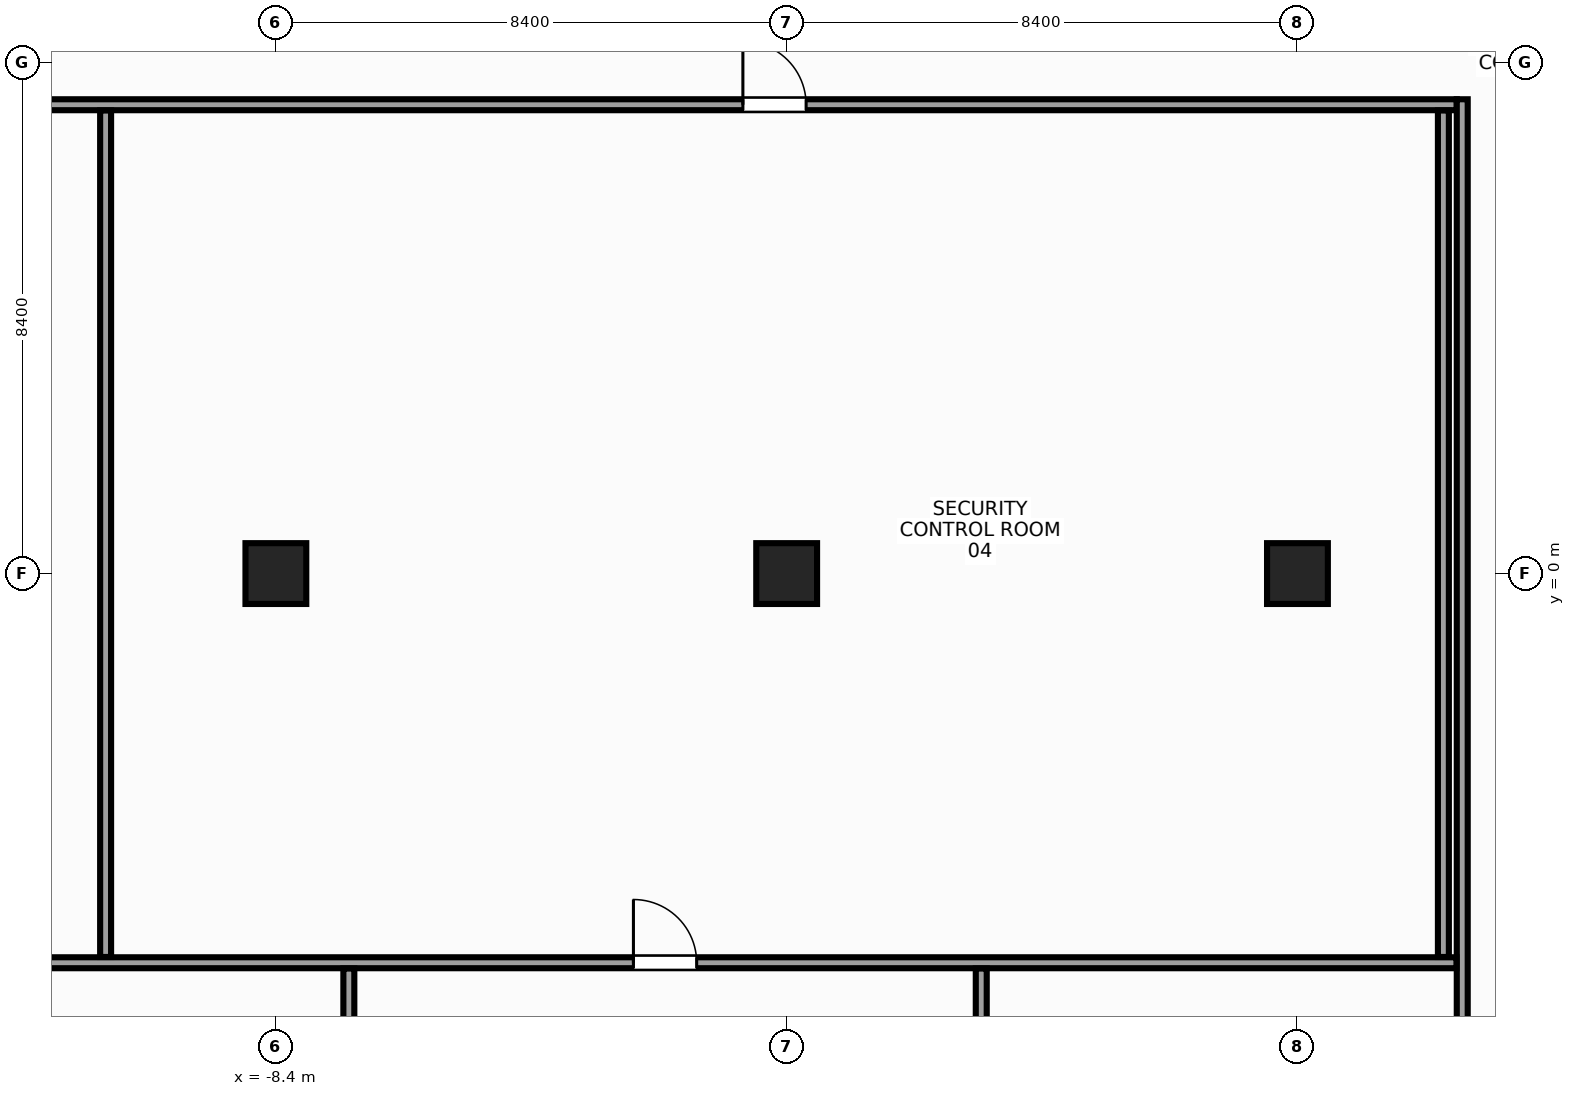
"""IFC4 building model, lengths in metres.
Left out: names, types, materials, properties, quantities, classifications, styles, units other than length and angle.
Written with IfcOpenShell. Run it as: python <this file> out.ifc"""

import sys

from ifc_helpers import new_model, si_unit, direction, frame, frame_2d, origin, origin_with_axes, origin_2d, place, context, subcontext, project, spatial, rectangle, hollow_rectangle, extrude, source, transform, mapped, element, fill, save


model = new_model("IFC4")
c1 = context("Model", 3, precision=1e-05, world=origin(), true_north=direction((0.0, 1.0)))
c2 = subcontext(c1, "Body", "Model", "MODEL_VIEW")
j1 = project(units=[si_unit("LENGTHUNIT", "METRE"), si_unit("PLANEANGLEUNIT", "RADIAN")], contexts=[c1])
p1 = place(None, origin())
s1 = spatial("IfcSite", under=j1, at=p1, CompositionType="ELEMENT")
p2 = place(p1, origin())
s2 = spatial("IfcBuilding", under=s1, at=p2, CompositionType="ELEMENT")
p3 = place(p2, frame((0.0, 0.0, 174.8)))
s3 = spatial("IfcBuildingStorey", under=s2, at=p3, CompositionType="ELEMENT", Elevation=174.8)
m1 = source(origin(), c2, "Body", "SweptSolid", [
    extrude(hollow_rectangle(XDim=1.0, YDim=1.0, WallThickness=0.045, at=origin_2d()), origin(), (0.0, 0.0, 1.0), 3.6),
])
for number, where, z_axis, x_axis in (
    (1, (-8.4, 0.0, 0.0), (0.0, 0.0, 1.0), (1.0, 0.0, 0.0)),
    (2, (8.4, 0.0, 0.0), (0.0, 0.0, 1.0), (1.0, 0.0, 0.0)),
):
    element("IfcColumn", number, at=place(p3, frame(where, z_axis=z_axis, x_axis=x_axis)), inside=s3, PredefinedType="COLUMN", context=c2, shape_type="MappedRepresentation", body=[
        mapped(m1, transform((0.0, 0.0, 0.0), x_axis=(1.0, 0.0, 0.0), y_axis=(0.0, 1.0, 0.0), z_axis=(0.0, 0.0, 1.0), scale=1.0)),
    ])
m2 = source(origin(), c2, "Body", "SweptSolid", [
    extrude(rectangle(XDim=1.0, YDim=1.0, at=origin_2d()), origin(), (0.0, 0.0, 1.0), 3.6),
])
p4 = place(p3, origin_with_axes())
e3 = element("IfcColumn", 3, at=p4, inside=s3, PredefinedType="COLUMN", context=c2, shape_type="MappedRepresentation", body=[
    mapped(m2, transform((0.0, 0.0, 0.0), x_axis=(1.0, 0.0, 0.0), y_axis=(0.0, 1.0, 0.0), z_axis=(0.0, 0.0, 1.0), scale=1.0)),
])
m3 = source(origin(), c2, "Body", "SweptSolid", [
    extrude(rectangle(XDim=31.6, YDim=0.18, at=frame_2d((15.8, 0.0))), origin(), (0.0, 0.0, 1.0), 2.765),
])
p5 = place(p3, frame((-20.58, 7.71, 0.0), z_axis=(0.0, 0.0, 1.0), x_axis=(1.0, 0.0, 0.0)))
e4 = element("IfcWall", 4, at=p5, inside=s3, PredefinedType="PARTITIONING", context=c2, shape_type="MappedRepresentation", body=[
    mapped(m3, transform((0.0, 0.0, 0.0), x_axis=(1.0, 0.0, 0.0), y_axis=(0.0, 1.0, 0.0), z_axis=(0.0, 0.0, 1.0), scale=1.0)),
])
p6 = place(p5, frame((0.495, 0.0, 0.0)))
e5 = element("IfcOpeningElement", 5, at=p6, cuts=e4, PredefinedType="OPENING", context=c2, shape_type="SweptSolid", body=[
    extrude(rectangle(XDim=1.04, YDim=2.2, at=frame_2d((0.52, 1.1))), frame((0.0, 0.102, 0.0), z_axis=(0.0, -1.0, 0.0), x_axis=(1.0, 0.0, 0.0)), (0.0, 0.0, 1.0), 0.204),
])
p7 = place(p5, frame((5.16, 0.0, 0.0)))
e6 = element("IfcOpeningElement", 6, at=p7, cuts=e4, PredefinedType="OPENING", context=c2, shape_type="SweptSolid", body=[
    extrude(rectangle(XDim=1.04, YDim=2.2, at=frame_2d((0.52, 1.1))), frame((0.0, 0.102, 0.0), z_axis=(0.0, -1.0, 0.0), x_axis=(1.0, 0.0, 0.0)), (0.0, 0.0, 1.0), 0.204),
])
p8 = place(p5, frame((19.86, 0.0, 0.0)))
e7 = element("IfcOpeningElement", 7, at=p8, cuts=e4, PredefinedType="OPENING", context=c2, shape_type="SweptSolid", body=[
    extrude(rectangle(XDim=1.04, YDim=2.2, at=frame_2d((0.52, 1.1))), frame((0.0, 0.102, 0.0), z_axis=(0.0, -1.0, 0.0), x_axis=(1.0, 0.0, 0.0)), (0.0, 0.0, 1.0), 0.204),
])
m4 = source(origin(), c2, "Body", "SweptSolid", [
    extrude(rectangle(XDim=22.595, YDim=0.18, at=frame_2d((11.297, 0.0))), origin(), (0.0, 0.0, 1.0), 2.665),
])
p9 = place(p3, frame((11.11, -14.795, 0.0), z_axis=(0.0, 0.0, 1.0), x_axis=(0.0, 1.0, 0.0)))
e8 = element("IfcWall", 8, at=p9, inside=s3, PredefinedType="PARTITIONING", context=c2, shape_type="MappedRepresentation", body=[
    mapped(m4, transform((0.0, 0.0, 0.0), x_axis=(1.0, 0.0, 0.0), y_axis=(0.0, 1.0, 0.0), z_axis=(0.0, 0.0, 1.0), scale=1.0)),
])
m5 = source(origin(), c2, "Body", "SweptSolid", [
    extrude(rectangle(XDim=34.865, YDim=0.18, at=frame_2d((17.433, 0.0))), origin(), (0.0, 0.0, 1.0), 2.765),
])
p10 = place(p3, frame((-23.85, -6.4, 0.0), z_axis=(0.0, 0.0, 1.0), x_axis=(1.0, 0.0, 0.0)))
e9 = element("IfcWall", 9, at=p10, inside=s3, PredefinedType="PARTITIONING", context=c2, shape_type="MappedRepresentation", body=[
    mapped(m5, transform((0.0, 0.0, 0.0), x_axis=(1.0, 0.0, 0.0), y_axis=(0.0, 1.0, 0.0), z_axis=(0.0, 0.0, 1.0), scale=1.0)),
])
p11 = place(p10, frame((1.9, 0.0, 0.0)))
e10 = element("IfcOpeningElement", 10, at=p11, cuts=e9, PredefinedType="OPENING", context=c2, shape_type="SweptSolid", body=[
    extrude(rectangle(XDim=1.04, YDim=2.2, at=frame_2d((0.52, 1.1))), frame((0.0, 0.102, 0.0), z_axis=(0.0, -1.0, 0.0), x_axis=(1.0, 0.0, 0.0)), (0.0, 0.0, 1.0), 0.204),
])
p12 = place(p10, frame((9.33, 0.0, 0.0)))
e11 = element("IfcOpeningElement", 11, at=p12, cuts=e9, PredefinedType="OPENING", context=c2, shape_type="SweptSolid", body=[
    extrude(rectangle(XDim=1.04, YDim=2.2, at=frame_2d((0.52, 1.1))), frame((0.0, 0.102, 0.0), z_axis=(0.0, -1.0, 0.0), x_axis=(1.0, 0.0, 0.0)), (0.0, 0.0, 1.0), 0.204),
])
p13 = place(p10, frame((21.33, 0.0, 0.0)))
e12 = element("IfcOpeningElement", 12, at=p13, cuts=e9, PredefinedType="OPENING", context=c2, shape_type="SweptSolid", body=[
    extrude(rectangle(XDim=1.04, YDim=2.2, at=frame_2d((0.52, 1.1))), frame((0.0, 0.102, 0.0), z_axis=(0.0, -1.0, 0.0), x_axis=(1.0, 0.0, 0.0)), (0.0, 0.0, 1.0), 0.204),
])
m6 = source(origin(), c2, "Body", "SweptSolid", [
    extrude(rectangle(XDim=13.92, YDim=0.18, at=frame_2d((6.96, 0.0))), origin(), (0.0, 0.0, 1.0), 2.665),
])
for number, where, z_axis, x_axis in (
    (13, (-11.2, -6.305, 0.0), (0.0, 0.0, 1.0), (0.0, 1.0, 0.0)),
    (14, (10.8, -6.305, 0.0), (0.0, 0.0, 1.0), (0.0, 1.0, 0.0)),
):
    element("IfcWall", number, at=place(p3, frame(where, z_axis=z_axis, x_axis=x_axis)), inside=s3, PredefinedType="PARTITIONING", context=c2, shape_type="MappedRepresentation", body=[
        mapped(m6, transform((0.0, 0.0, 0.0), x_axis=(1.0, 0.0, 0.0), y_axis=(0.0, 1.0, 0.0), z_axis=(0.0, 0.0, 1.0), scale=1.0)),
    ])
m7 = source(origin(), c2, "Body", "SweptSolid", [
    extrude(rectangle(XDim=16.155, YDim=0.18, at=frame_2d((8.077, 0.0))), origin(), (0.0, 0.0, 1.0), 2.915),
])
for number, where, z_axis, x_axis in (
    (15, (-7.2, -22.65, 0.0), (0.0, 0.0, 1.0), (0.0, 1.0, 0.0)),
    (16, (3.2, -22.65, 0.0), (0.0, 0.0, 1.0), (0.0, 1.0, 0.0)),
):
    element("IfcWall", number, at=place(p3, frame(where, z_axis=z_axis, x_axis=x_axis)), inside=s3, PredefinedType="PARTITIONING", context=c2, shape_type="MappedRepresentation", body=[
        mapped(m7, transform((0.0, 0.0, 0.0), x_axis=(1.0, 0.0, 0.0), y_axis=(0.0, 1.0, 0.0), z_axis=(0.0, 0.0, 1.0), scale=1.0)),
    ])
m8 = source(origin(), c2, "Body", "SweptSolid", [
    extrude(rectangle(XDim=1.04, YDim=2.2, at=frame_2d((0.52, 1.1))), frame((0.0, 0.025, 0.0), z_axis=(0.0, -1.0, 0.0), x_axis=(1.0, 0.0, 0.0)), (0.0, 0.0, 1.0), 0.05),
])
p14 = place(p8, origin())
e17 = element("IfcDoor", 17, at=p14, inside=s3, OperationType="SINGLE_SWING_LEFT", PredefinedType="DOOR", context=c2, shape_type="MappedRepresentation", body=[
    mapped(m8, transform((0.0, 0.0, 0.0), x_axis=(1.0, 0.0, 0.0), y_axis=(0.0, 1.0, 0.0), z_axis=(0.0, 0.0, 1.0), scale=1.0)),
])
fill(e7, e17)
p15 = place(p13, origin())
e18 = element("IfcDoor", 18, at=p15, inside=s3, OperationType="SINGLE_SWING_LEFT", PredefinedType="DOOR", context=c2, shape_type="MappedRepresentation", body=[
    mapped(m8, transform((0.0, 0.0, 0.0), x_axis=(1.0, 0.0, 0.0), y_axis=(0.0, 1.0, 0.0), z_axis=(0.0, 0.0, 1.0), scale=1.0)),
])
fill(e12, e18)
save(model, sys.argv[1])
